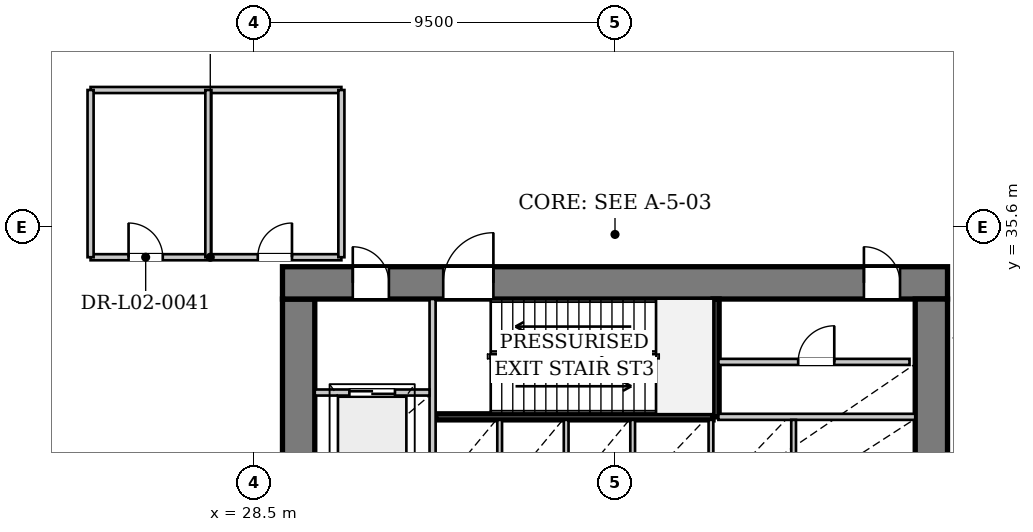
"""IFC4 building model, lengths in metres.
Left out: names, types, materials, properties, quantities, classifications, styles, units other than length and angle.
Written with IfcOpenShell. Run it as: python <this file> out.ifc"""

import sys

from ifc_helpers import new_model, si_unit, direction, frame, frame_2d, origin, place, context, subcontext, project, spatial, rectangle, extrude, source, transform, mapped, element, fill, save


model = new_model("IFC4")
c1 = context("Model", 3, precision=1e-05, world=origin(), true_north=direction((0.0, 1.0)))
c2 = subcontext(c1, "Body", "Model", "MODEL_VIEW")
j1 = project(units=[si_unit("LENGTHUNIT", "METRE"), si_unit("PLANEANGLEUNIT", "RADIAN")], contexts=[c1])
p1 = place(None, origin())
s1 = spatial("IfcSite", under=j1, at=p1, CompositionType="ELEMENT")
p2 = place(p1, origin())
s2 = spatial("IfcBuilding", under=s1, at=p2, CompositionType="ELEMENT")
p3 = place(p2, frame((0.0, 0.0, 10.2)))
s3 = spatial("IfcBuildingStorey", under=s2, at=p3, CompositionType="ELEMENT", Elevation=10.2)
p4 = place(p3, frame((29.675, 19.5, 0.0), z_axis=(0.0, 0.0, 1.0), x_axis=(0.0, 1.0, 0.0)))
e1 = element("IfcWall", 1, at=p4, inside=s3, PredefinedType="SHEAR", context=c2, shape_type="SweptSolid", body=[
    extrude(rectangle(XDim=14.2, YDim=0.85, at=frame_2d((7.1, 0.0))), origin(), (0.0, 0.0, 1.0), 5.08),
])
p5 = place(p4, frame((7.42, 0.0, 0.0)))
e2 = element("IfcOpeningElement", 2, at=p5, cuts=e1, PredefinedType="OPENING", context=c2, shape_type="SweptSolid", body=[
    extrude(rectangle(XDim=1.6, YDim=2.2, at=frame_2d((0.8, 1.1))), frame((0.0, 0.435, 0.0), z_axis=(0.0, -1.0, 0.0), x_axis=(1.0, 0.0, 0.0)), (0.0, 0.0, 1.0), 0.87),
])
p6 = place(p3, frame((29.25, 34.125, 0.0), z_axis=(0.0, 0.0, 1.0), x_axis=(1.0, 0.0, 0.0)))
e3 = element("IfcWall", 3, at=p6, inside=s3, PredefinedType="SHEAR", context=c2, shape_type="SweptSolid", body=[
    extrude(rectangle(XDim=17.5, YDim=0.85, at=frame_2d((8.75, 0.0))), origin(), (0.0, 0.0, 1.0), 5.08),
])
p7 = place(p6, frame((1.85, 0.0, 0.0)))
e4 = element("IfcOpeningElement", 4, at=p7, cuts=e3, PredefinedType="OPENING", context=c2, shape_type="SweptSolid", body=[
    extrude(rectangle(XDim=0.95, YDim=2.1, at=frame_2d((0.475, 1.05))), frame((0.0, 0.435, 0.0), z_axis=(0.0, -1.0, 0.0), x_axis=(1.0, 0.0, 0.0)), (0.0, 0.0, 1.0), 0.87),
])
p8 = place(p6, frame((4.23, 0.0, 0.0)))
e5 = element("IfcOpeningElement", 5, at=p8, cuts=e3, PredefinedType="OPENING", context=c2, shape_type="SweptSolid", body=[
    extrude(rectangle(XDim=1.32, YDim=2.2, at=frame_2d((0.66, 1.1))), frame((0.0, 0.435, 0.0), z_axis=(0.0, -1.0, 0.0), x_axis=(1.0, 0.0, 0.0)), (0.0, 0.0, 1.0), 0.87),
])
p9 = place(p6, frame((15.3, 0.0, 0.0)))
e6 = element("IfcOpeningElement", 6, at=p9, cuts=e3, PredefinedType="OPENING", context=c2, shape_type="SweptSolid", body=[
    extrude(rectangle(XDim=0.95, YDim=2.1, at=frame_2d((0.475, 1.05))), frame((0.0, 0.435, 0.0), z_axis=(0.0, -1.0, 0.0), x_axis=(1.0, 0.0, 0.0)), (0.0, 0.0, 1.0), 0.87),
])
p10 = place(p3, frame((46.325, 33.7, 0.0), z_axis=(0.0, 0.0, 1.0), x_axis=(0.0, -1.0, 0.0)))
e7 = element("IfcWall", 7, at=p10, inside=s3, PredefinedType="SHEAR", context=c2, shape_type="SweptSolid", body=[
    extrude(rectangle(XDim=14.2, YDim=0.85, at=frame_2d((7.1, 0.0))), origin(), (0.0, 0.0, 1.0), 5.08),
])
p11 = place(p10, frame((5.18, 0.0, 0.0)))
e8 = element("IfcOpeningElement", 8, at=p11, cuts=e7, PredefinedType="OPENING", context=c2, shape_type="SweptSolid", body=[
    extrude(rectangle(XDim=1.6, YDim=2.2, at=frame_2d((0.8, 1.1))), frame((0.0, 0.435, 0.0), z_axis=(0.0, -1.0, 0.0), x_axis=(1.0, 0.0, 0.0)), (0.0, 0.0, 1.0), 0.87),
])
p12 = place(p3, frame((33.28, 30.6, 0.0), z_axis=(0.0, 0.0, 1.0), x_axis=(1.0, 0.0, 0.0)))
e9 = element("IfcWall", 9, at=p12, inside=s3, PredefinedType="PARTITIONING", context=c2, shape_type="SweptSolid", body=[
    extrude(rectangle(XDim=7.3, YDim=0.16, at=frame_2d((3.65, 0.0))), origin(), (0.0, 0.0, 1.0), 5.08),
])
p13 = place(p3, frame((40.66, 30.6, 0.0), z_axis=(0.0, 0.0, 1.0), x_axis=(0.0, 1.0, 0.0)))
e10 = element("IfcWall", 10, at=p13, inside=s3, PredefinedType="PARTITIONING", context=c2, shape_type="SweptSolid", body=[
    extrude(rectangle(XDim=3.1, YDim=0.16, at=frame_2d((1.55, 0.0))), origin(), (0.0, 0.0, 1.0), 5.08),
])
p14 = place(p3, frame((33.2, 28.44, 0.0), z_axis=(0.0, 0.0, 1.0), x_axis=(0.0, 1.0, 0.0)))
e11 = element("IfcWall", 11, at=p14, inside=s3, PredefinedType="PARTITIONING", context=c2, shape_type="SweptSolid", body=[
    extrude(rectangle(XDim=5.26, YDim=0.16, at=frame_2d((2.63, 0.0))), origin(), (0.0, 0.0, 1.0), 5.08),
])
p15 = place(p3, frame((30.1, 31.24, 0.0), z_axis=(0.0, 0.0, 1.0), x_axis=(1.0, 0.0, 0.0)))
e12 = element("IfcWall", 12, at=p15, inside=s3, PredefinedType="PARTITIONING", context=c2, shape_type="SweptSolid", body=[
    extrude(rectangle(XDim=3.02, YDim=0.16, at=frame_2d((1.51, 0.0))), origin(), (0.0, 0.0, 1.0), 5.08),
])
p16 = place(p15, frame((0.91, 0.0, 0.0)))
e13 = element("IfcOpeningElement", 13, at=p16, cuts=e12, PredefinedType="OPENING", context=c2, shape_type="SweptSolid", body=[
    extrude(rectangle(XDim=1.2, YDim=2.2, at=frame_2d((0.6, 1.1))), frame((0.0, 0.09, 0.0), z_axis=(0.0, -1.0, 0.0), x_axis=(1.0, 0.0, 0.0)), (0.0, 0.0, 1.0), 0.18),
])
p17 = place(p3, frame((40.72, 30.6, 0.0), z_axis=(0.0, 0.0, 1.0), x_axis=(1.0, 0.0, 0.0)))
e14 = element("IfcWall", 14, at=p17, inside=s3, PredefinedType="PARTITIONING", context=c2, shape_type="SweptSolid", body=[
    extrude(rectangle(XDim=5.18, YDim=0.16, at=frame_2d((2.59, 0.0))), origin(), (0.0, 0.0, 1.0), 5.08),
])
for number, where, z_axis, x_axis in (
    (15, (34.965, 28.6, 0.0), (0.0, 0.0, 1.0), (0.0, 1.0, 0.0)),
    (16, (36.715, 28.6, 0.0), (0.0, 0.0, 1.0), (0.0, 1.0, 0.0)),
    (17, (38.465, 28.6, 0.0), (0.0, 0.0, 1.0), (0.0, 1.0, 0.0)),
    (18, (40.525, 28.6, 0.0), (0.0, 0.0, 1.0), (0.0, 1.0, 0.0)),
    (19, (42.7, 28.6, 0.0), (0.0, 0.0, 1.0), (0.0, 1.0, 0.0)),
):
    element("IfcWall", number, at=place(p3, frame(where, z_axis=z_axis, x_axis=x_axis)), inside=s3, PredefinedType="PARTITIONING", context=c2, shape_type="SweptSolid", body=[
        extrude(rectangle(XDim=1.92, YDim=0.125, at=frame_2d((0.96, 0.0))), origin(), (0.0, 0.0, 1.0), 5.08),
    ])
p18 = place(p3, frame((40.72, 32.046, 0.0), z_axis=(0.0, 0.0, 1.0), x_axis=(1.0, 0.0, 0.0)))
e20 = element("IfcWall", 20, at=p18, inside=s3, PredefinedType="PARTITIONING", context=c2, shape_type="SweptSolid", body=[
    extrude(rectangle(XDim=5.03, YDim=0.16, at=frame_2d((2.515, 0.0))), origin(), (0.0, 0.0, 1.0), 5.08),
])
p19 = place(p18, frame((2.1, 0.0, 0.0)))
e21 = element("IfcOpeningElement", 21, at=p19, cuts=e20, PredefinedType="OPENING", context=c2, shape_type="SweptSolid", body=[
    extrude(rectangle(XDim=0.95, YDim=2.1, at=frame_2d((0.475, 1.05))), frame((0.0, 0.09, 0.0), z_axis=(0.0, -1.0, 0.0), x_axis=(1.0, 0.0, 0.0)), (0.0, 0.0, 1.0), 0.18),
])
p20 = place(p3, frame((24.2, 34.8, 0.0), z_axis=(0.0, 0.0, 1.0), x_axis=(1.0, 0.0, 0.0)))
e22 = element("IfcWall", 22, at=p20, inside=s3, PredefinedType="PARTITIONING", context=c2, shape_type="SweptSolid", body=[
    extrude(rectangle(XDim=6.6, YDim=0.16, at=frame_2d((3.3, 0.0))), origin(), (0.0, 0.0, 1.0), 4.43),
])
p21 = place(p20, frame((1.0, 0.0, 0.0)))
e23 = element("IfcOpeningElement", 23, at=p21, cuts=e22, PredefinedType="OPENING", context=c2, shape_type="SweptSolid", body=[
    extrude(rectangle(XDim=0.9, YDim=2.1, at=frame_2d((0.45, 1.05))), frame((0.0, 0.09, 0.0), z_axis=(0.0, -1.0, 0.0), x_axis=(1.0, 0.0, 0.0)), (0.0, 0.0, 1.0), 0.18),
])
p22 = place(p20, frame((4.4, 0.0, 0.0)))
e24 = element("IfcOpeningElement", 24, at=p22, cuts=e22, PredefinedType="OPENING", context=c2, shape_type="SweptSolid", body=[
    extrude(rectangle(XDim=0.9, YDim=2.1, at=frame_2d((0.45, 1.05))), frame((0.0, 0.09, 0.0), z_axis=(0.0, -1.0, 0.0), x_axis=(1.0, 0.0, 0.0)), (0.0, 0.0, 1.0), 0.18),
])
p23 = place(p3, frame((24.2, 39.2, 0.0), z_axis=(0.0, 0.0, 1.0), x_axis=(1.0, 0.0, 0.0)))
e25 = element("IfcWall", 25, at=p23, inside=s3, PredefinedType="PARTITIONING", context=c2, shape_type="SweptSolid", body=[
    extrude(rectangle(XDim=6.6, YDim=0.16, at=frame_2d((3.3, 0.0))), origin(), (0.0, 0.0, 1.0), 4.43),
])
for number, where, z_axis, x_axis in (
    (26, (24.2, 34.8, 0.0), (0.0, 0.0, 1.0), (0.0, 1.0, 0.0)),
    (27, (27.3, 34.8, 0.0), (0.0, 0.0, 1.0), (0.0, 1.0, 0.0)),
    (28, (30.8, 34.8, 0.0), (0.0, 0.0, 1.0), (0.0, 1.0, 0.0)),
):
    element("IfcWall", number, at=place(p3, frame(where, z_axis=z_axis, x_axis=x_axis)), inside=s3, PredefinedType="PARTITIONING", context=c2, shape_type="SweptSolid", body=[
        extrude(rectangle(XDim=4.4, YDim=0.16, at=frame_2d((2.2, 0.0))), origin(), (0.0, 0.0, 1.0), 4.43),
    ])
m1 = source(origin(), c2, "Body", "SweptSolid", [
    extrude(rectangle(XDim=0.95, YDim=2.1, at=frame_2d((0.475, 1.05))), frame((0.0, 0.025, 0.0), z_axis=(0.0, -1.0, 0.0), x_axis=(1.0, 0.0, 0.0)), (0.0, 0.0, 1.0), 0.05),
])
p24 = place(p7, origin())
e29 = element("IfcDoor", 29, at=p24, inside=s3, OperationType="SINGLE_SWING_LEFT", PredefinedType="DOOR", context=c2, shape_type="MappedRepresentation", body=[
    mapped(m1, transform((0.0, 0.0, 0.0), x_axis=(1.0, 0.0, 0.0), y_axis=(0.0, 1.0, 0.0), z_axis=(0.0, 0.0, 1.0), scale=1.0)),
])
fill(e4, e29)
m2 = source(origin(), c2, "Body", "SweptSolid", [
    extrude(rectangle(XDim=1.32, YDim=2.2, at=frame_2d((0.66, 1.1))), frame((0.0, 0.025, 0.0), z_axis=(0.0, -1.0, 0.0), x_axis=(1.0, 0.0, 0.0)), (0.0, 0.0, 1.0), 0.05),
])
p25 = place(p8, origin())
e30 = element("IfcDoor", 30, at=p25, inside=s3, OperationType="SINGLE_SWING_RIGHT", PredefinedType="DOOR", context=c2, shape_type="MappedRepresentation", body=[
    mapped(m2, transform((0.0, 0.0, 0.0), x_axis=(1.0, 0.0, 0.0), y_axis=(0.0, 1.0, 0.0), z_axis=(0.0, 0.0, 1.0), scale=1.0)),
])
fill(e5, e30)
m3 = source(origin(), c2, "Body", "SweptSolid", [
    extrude(rectangle(XDim=1.2, YDim=2.2, at=frame_2d((0.6, 1.1))), frame((0.0, 0.025, 0.0), z_axis=(0.0, -1.0, 0.0), x_axis=(1.0, 0.0, 0.0)), (0.0, 0.0, 1.0), 0.05),
])
p26 = place(p16, origin())
e31 = element("IfcDoor", 31, at=p26, inside=s3, OperationType="DOUBLE_DOOR_SLIDING", PredefinedType="DOOR", context=c2, shape_type="MappedRepresentation", body=[
    mapped(m3, transform((0.0, 0.0, 0.0), x_axis=(1.0, 0.0, 0.0), y_axis=(0.0, 1.0, 0.0), z_axis=(0.0, 0.0, 1.0), scale=1.0)),
])
fill(e13, e31)
p27 = place(p19, origin())
e32 = element("IfcDoor", 32, at=p27, inside=s3, OperationType="SINGLE_SWING_RIGHT", PredefinedType="DOOR", context=c2, shape_type="MappedRepresentation", body=[
    mapped(m1, transform((0.0, 0.0, 0.0), x_axis=(1.0, 0.0, 0.0), y_axis=(0.0, 1.0, 0.0), z_axis=(0.0, 0.0, 1.0), scale=1.0)),
])
fill(e21, e32)
p28 = place(p9, origin())
e33 = element("IfcDoor", 33, at=p28, inside=s3, OperationType="SINGLE_SWING_LEFT", PredefinedType="DOOR", context=c2, shape_type="MappedRepresentation", body=[
    mapped(m1, transform((0.0, 0.0, 0.0), x_axis=(1.0, 0.0, 0.0), y_axis=(0.0, 1.0, 0.0), z_axis=(0.0, 0.0, 1.0), scale=1.0)),
])
fill(e6, e33)
m4 = source(origin(), c2, "Body", "SweptSolid", [
    extrude(rectangle(XDim=0.9, YDim=2.1, at=frame_2d((0.45, 1.05))), frame((0.0, 0.025, 0.0), z_axis=(0.0, -1.0, 0.0), x_axis=(1.0, 0.0, 0.0)), (0.0, 0.0, 1.0), 0.05),
])
p29 = place(p21, origin())
e34 = element("IfcDoor", 34, at=p29, inside=s3, OperationType="SINGLE_SWING_LEFT", PredefinedType="DOOR", context=c2, shape_type="MappedRepresentation", body=[
    mapped(m4, transform((0.0, 0.0, 0.0), x_axis=(1.0, 0.0, 0.0), y_axis=(0.0, 1.0, 0.0), z_axis=(0.0, 0.0, 1.0), scale=1.0)),
])
fill(e23, e34)
p30 = place(p22, origin())
e35 = element("IfcDoor", 35, at=p30, inside=s3, OperationType="SINGLE_SWING_RIGHT", PredefinedType="DOOR", context=c2, shape_type="MappedRepresentation", body=[
    mapped(m4, transform((0.0, 0.0, 0.0), x_axis=(1.0, 0.0, 0.0), y_axis=(0.0, 1.0, 0.0), z_axis=(0.0, 0.0, 1.0), scale=1.0)),
])
fill(e24, e35)
save(model, sys.argv[1])
